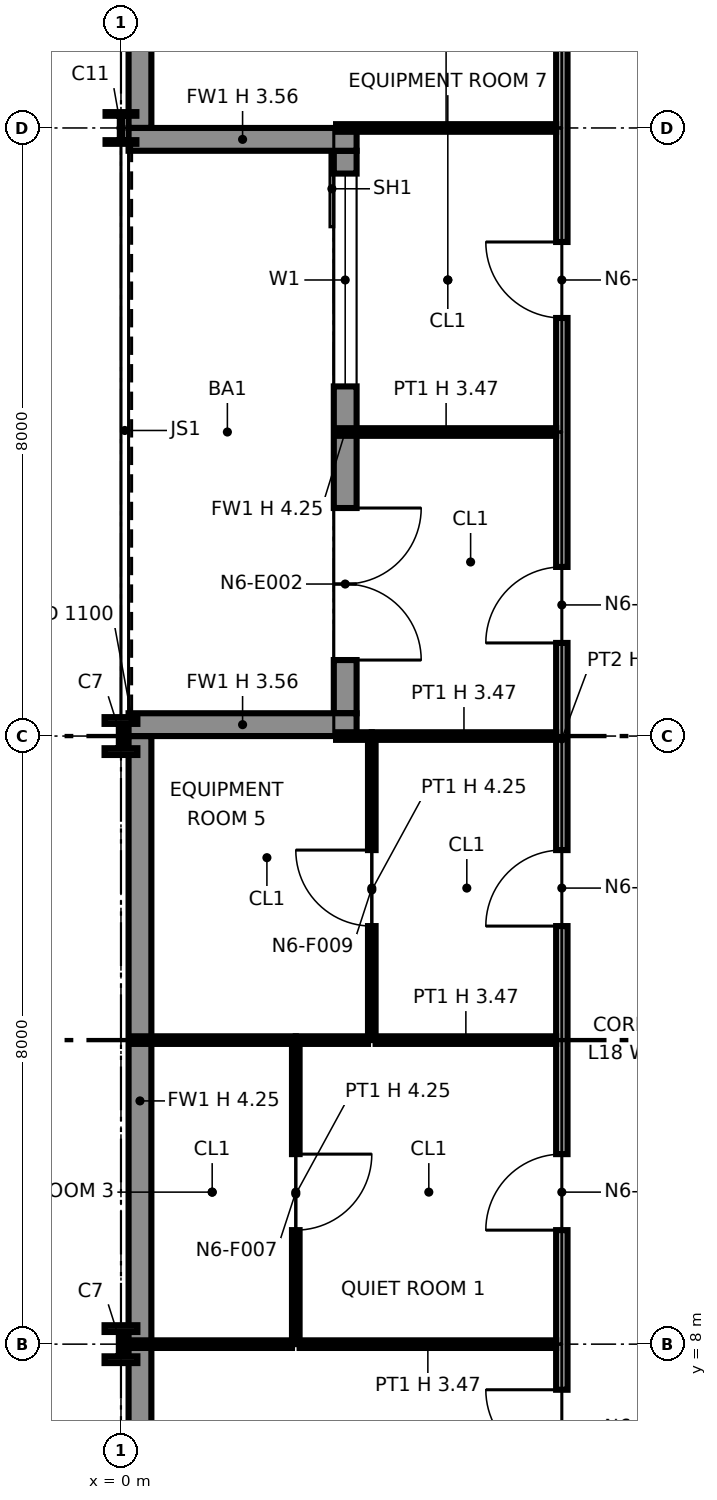
"""IFC4 building model, lengths in metres.
Left out: names, types, materials, properties, quantities, classifications, styles, units other than length and angle.
Written with IfcOpenShell. Run it as: python <this file> out.ifc"""

import sys

from ifc_helpers import new_model, si_unit, direction, frame, frame_2d, origin, origin_2d, place, context, subcontext, project, spatial, polyline, rectangle, i_section, outline, extrude, element, fill, save


model = new_model("IFC4")
c1 = context("Model", 3, precision=1e-05, world=origin(), true_north=direction((0.0, 1.0)))
c2 = subcontext(c1, "Body", "Model", "MODEL_VIEW")
j1 = project(units=[si_unit("LENGTHUNIT", "METRE"), si_unit("PLANEANGLEUNIT", "RADIAN")], contexts=[c1])
p1 = place(None, origin())
s1 = spatial("IfcSite", under=j1, at=p1, CompositionType="ELEMENT")
p2 = place(p1, origin())
s2 = spatial("IfcBuilding", under=s1, at=p2, CompositionType="ELEMENT")
p3 = place(p2, frame((0.0, 0.0, 96.4)))
s3 = spatial("IfcBuildingStorey", under=s2, at=p3, CompositionType="ELEMENT", Elevation=96.4)
for number, where, z_axis, x_axis in (
    (1, (0.0, 8.0, 0.0), (0.0, 0.0, 1.0), (1.0, 0.0, 0.0)),
    (2, (0.0, 16.0, 0.0), (0.0, 0.0, 1.0), (1.0, 0.0, 0.0)),
):
    element("IfcColumn", number, at=place(p3, frame(where, z_axis=z_axis, x_axis=x_axis)), inside=s3, PredefinedType="COLUMN", context=c2, shape_type="SweptSolid", body=[
        extrude(i_section(OverallWidth=0.432, OverallDepth=0.498, WebThickness=0.056, FlangeThickness=0.089, at=origin_2d()), origin(), (0.0, 0.0, 1.0), 4.25),
    ])
p4 = place(p3, frame((0.0, 24.0, 0.0), z_axis=(0.0, 0.0, 1.0), x_axis=(1.0, 0.0, 0.0)))
e3 = element("IfcColumn", 3, at=p4, inside=s3, PredefinedType="COLUMN", context=c2, shape_type="SweptSolid", body=[
    extrude(i_section(OverallWidth=0.406, OverallDepth=0.417, WebThickness=0.03, FlangeThickness=0.048, at=origin_2d()), origin(), (0.0, 0.0, 1.0), 4.25),
])
p5 = place(p3, frame((0.25, 32.0, 0.0), z_axis=(0.0, 0.0, 1.0), x_axis=(0.0, -1.0, 0.0)))
e4 = element("IfcWall", 4, at=p5, inside=s3, PredefinedType="SOLIDWALL", context=c2, shape_type="SweptSolid", body=[
    extrude(rectangle(XDim=8.0, YDim=0.3, at=frame_2d((4.0, 0.0))), origin(), (0.0, 0.0, 1.0), 4.25),
])
p6 = place(p3, frame((2.95, 23.7, 0.0), z_axis=(0.0, 0.0, 1.0), x_axis=(0.0, -1.0, 0.0)))
e5 = element("IfcWall", 5, at=p6, inside=s3, PredefinedType="SOLIDWALL", context=c2, shape_type="SweptSolid", body=[
    extrude(rectangle(XDim=7.4, YDim=0.3, at=frame_2d((3.7, 0.0))), origin(), (0.0, 0.0, 1.0), 4.25),
])
p7 = place(p6, frame((0.3, 0.0, 0.9)))
e6 = element("IfcOpeningElement", 6, at=p7, cuts=e5, PredefinedType="OPENING", context=c2, shape_type="SweptSolid", body=[
    extrude(rectangle(XDim=2.8, YDim=2.2, at=frame_2d((1.4, 1.1))), frame((0.0, 0.16, 0.0), z_axis=(0.0, -1.0, 0.0), x_axis=(1.0, 0.0, 0.0)), (0.0, 0.0, 1.0), 0.32),
])
p8 = place(p6, frame((4.7, 0.0, 0.0)))
e7 = element("IfcOpeningElement", 7, at=p8, cuts=e5, PredefinedType="OPENING", context=c2, shape_type="SweptSolid", body=[
    extrude(rectangle(XDim=2.0, YDim=2.4, at=frame_2d((1.0, 1.2))), frame((0.0, 0.16, 0.0), z_axis=(0.0, -1.0, 0.0), x_axis=(1.0, 0.0, 0.0)), (0.0, 0.0, 1.0), 0.32),
])
for number, where, z_axis, x_axis in (
    (8, (0.1, 23.85, 0.0), (0.0, 0.0, 1.0), (1.0, 0.0, 0.0)),
    (9, (0.1, 16.15, 0.0), (0.0, 0.0, 1.0), (1.0, 0.0, 0.0)),
):
    element("IfcWall", number, at=place(p3, frame(where, z_axis=z_axis, x_axis=x_axis)), inside=s3, PredefinedType="SOLIDWALL", context=c2, shape_type="SweptSolid", body=[
        extrude(rectangle(XDim=3.0, YDim=0.3, at=frame_2d((1.5, 0.0))), origin(), (0.0, 0.0, 1.0), 3.556),
    ])
p9 = place(p3, frame((0.25, 16.0, 0.0), z_axis=(0.0, 0.0, 1.0), x_axis=(0.0, -1.0, 0.0)))
e10 = element("IfcWall", 10, at=p9, inside=s3, PredefinedType="SOLIDWALL", context=c2, shape_type="SweptSolid", body=[
    extrude(rectangle(XDim=9.6, YDim=0.3, at=frame_2d((4.8, 0.0))), origin(), (0.0, 0.0, 1.0), 4.25),
])
p10 = place(p3, frame((5.8, 5.8, 0.0), z_axis=(0.0, 0.0, 1.0), x_axis=(0.0, 1.0, 0.0)))
e11 = element("IfcWall", 11, at=p10, inside=s3, PredefinedType="PARTITIONING", context=c2, shape_type="SweptSolid", body=[
    extrude(outline(polyline([(0.0, 0.0), (20.325, 0.0), (20.325, 4.25), (18.5, 4.25), (18.498, 3.47), (17.902, 3.47), (17.9, 4.25), (14.5, 4.25), (14.498, 3.47), (13.902, 3.47), (13.9, 4.25), (10.5, 4.25), (10.498, 3.47), (9.902, 3.47), (9.9, 4.25), (6.5, 4.25), (6.498, 3.47), (5.902, 3.47), (5.9, 4.25), (2.5, 4.25), (2.498, 3.47), (1.902, 3.47), (1.9, 4.25), (0.0, 4.25), (0.0, 0.0)])), frame((0.0, 0.075, 0.0), z_axis=(0.0, -1.0, 0.0), x_axis=(1.0, 0.0, 0.0)), (0.0, 0.0, 1.0), 0.15),
])
p11 = place(p10, frame((0.6, 0.0, 0.0)))
e12 = element("IfcOpeningElement", 12, at=p11, cuts=e11, PredefinedType="OPENING", context=c2, shape_type="SweptSolid", body=[
    extrude(rectangle(XDim=1.0, YDim=2.1, at=frame_2d((0.5, 1.05))), frame((0.0, 0.085, 0.0), z_axis=(0.0, -1.0, 0.0), x_axis=(1.0, 0.0, 0.0)), (0.0, 0.0, 1.0), 0.17),
])
p12 = place(p10, frame((3.7, 0.0, 0.0)))
e13 = element("IfcOpeningElement", 13, at=p12, cuts=e11, PredefinedType="OPENING", context=c2, shape_type="SweptSolid", body=[
    extrude(rectangle(XDim=1.0, YDim=2.1, at=frame_2d((0.5, 1.05))), frame((0.0, 0.085, 0.0), z_axis=(0.0, -1.0, 0.0), x_axis=(1.0, 0.0, 0.0)), (0.0, 0.0, 1.0), 0.17),
])
p13 = place(p10, frame((7.7, 0.0, 0.0)))
e14 = element("IfcOpeningElement", 14, at=p13, cuts=e11, PredefinedType="OPENING", context=c2, shape_type="SweptSolid", body=[
    extrude(rectangle(XDim=1.0, YDim=2.1, at=frame_2d((0.5, 1.05))), frame((0.0, 0.085, 0.0), z_axis=(0.0, -1.0, 0.0), x_axis=(1.0, 0.0, 0.0)), (0.0, 0.0, 1.0), 0.17),
])
p14 = place(p10, frame((11.425, 0.0, 0.0)))
e15 = element("IfcOpeningElement", 15, at=p14, cuts=e11, PredefinedType="OPENING", context=c2, shape_type="SweptSolid", body=[
    extrude(rectangle(XDim=1.0, YDim=2.1, at=frame_2d((0.5, 1.05))), frame((0.0, 0.085, 0.0), z_axis=(0.0, -1.0, 0.0), x_axis=(1.0, 0.0, 0.0)), (0.0, 0.0, 1.0), 0.17),
])
p15 = place(p10, frame((15.7, 0.0, 0.0)))
e16 = element("IfcOpeningElement", 16, at=p15, cuts=e11, PredefinedType="OPENING", context=c2, shape_type="SweptSolid", body=[
    extrude(rectangle(XDim=1.0, YDim=2.1, at=frame_2d((0.5, 1.05))), frame((0.0, 0.085, 0.0), z_axis=(0.0, -1.0, 0.0), x_axis=(1.0, 0.0, 0.0)), (0.0, 0.0, 1.0), 0.17),
])
p16 = place(p3, frame((0.13, 8.0, 0.0), z_axis=(0.0, 0.0, 1.0), x_axis=(1.0, 0.0, 0.0)))
e17 = element("IfcWall", 17, at=p16, inside=s3, PredefinedType="PARTITIONING", context=c2, shape_type="SweptSolid", body=[
    extrude(rectangle(XDim=2.12, YDim=0.1, at=frame_2d((1.06, 0.0))), origin(), (0.0, 0.0, 1.0), 3.47),
])
p17 = place(p3, frame((2.35, 8.0, 0.0), z_axis=(0.0, 0.0, 1.0), x_axis=(1.0, 0.0, 0.0)))
e18 = element("IfcWall", 18, at=p17, inside=s3, PredefinedType="PARTITIONING", context=c2, shape_type="SweptSolid", body=[
    extrude(rectangle(XDim=3.375, YDim=0.1, at=frame_2d((1.688, 0.0))), origin(), (0.0, 0.0, 1.0), 3.47),
])
p18 = place(p3, frame((2.3, 8.0, 0.0), z_axis=(0.0, 0.0, 1.0), x_axis=(0.0, 1.0, 0.0)))
e19 = element("IfcWall", 19, at=p18, inside=s3, PredefinedType="PARTITIONING", context=c2, shape_type="SweptSolid", body=[
    extrude(rectangle(XDim=3.95, YDim=0.1, at=frame_2d((1.975, 0.0))), origin(), (0.0, 0.0, 1.0), 4.25),
])
p19 = place(p18, frame((2.5, 0.0, 0.0), z_axis=(0.0, 0.0, 1.0), x_axis=(-1.0, 0.0, 0.0)))
e20 = element("IfcOpeningElement", 20, at=p19, cuts=e19, PredefinedType="OPENING", context=c2, shape_type="SweptSolid", body=[
    extrude(rectangle(XDim=1.0, YDim=2.1, at=frame_2d((0.5, 1.05))), frame((0.0, 0.06, 0.0), z_axis=(0.0, -1.0, 0.0), x_axis=(1.0, 0.0, 0.0)), (0.0, 0.0, 1.0), 0.12),
])
p20 = place(p3, frame((0.13, 12.0, 0.0), z_axis=(0.0, 0.0, 1.0), x_axis=(1.0, 0.0, 0.0)))
e21 = element("IfcWall", 21, at=p20, inside=s3, PredefinedType="PARTITIONING", context=c2, shape_type="SweptSolid", body=[
    extrude(rectangle(XDim=2.17, YDim=0.1, at=frame_2d((1.085, 0.0))), origin(), (0.0, 0.0, 1.0), 3.47),
])
p21 = place(p3, frame((2.3, 12.0, 0.0), z_axis=(0.0, 0.0, 1.0), x_axis=(1.0, 0.0, 0.0)))
e22 = element("IfcWall", 22, at=p21, inside=s3, PredefinedType="PARTITIONING", context=c2, shape_type="SweptSolid", body=[
    extrude(rectangle(XDim=0.95, YDim=0.1, at=frame_2d((0.475, 0.0))), origin(), (0.0, 0.0, 1.0), 3.47),
])
p22 = place(p3, frame((3.35, 12.0, 0.0), z_axis=(0.0, 0.0, 1.0), x_axis=(1.0, 0.0, 0.0)))
e23 = element("IfcWall", 23, at=p22, inside=s3, PredefinedType="PARTITIONING", context=c2, shape_type="SweptSolid", body=[
    extrude(rectangle(XDim=2.375, YDim=0.1, at=frame_2d((1.188, 0.0))), origin(), (0.0, 0.0, 1.0), 3.47),
])
p23 = place(p3, frame((3.3, 12.0, 0.0), z_axis=(0.0, 0.0, 1.0), x_axis=(0.0, 1.0, 0.0)))
e24 = element("IfcWall", 24, at=p23, inside=s3, PredefinedType="PARTITIONING", context=c2, shape_type="SweptSolid", body=[
    extrude(rectangle(XDim=3.95, YDim=0.1, at=frame_2d((1.975, 0.0))), origin(), (0.0, 0.0, 1.0), 4.25),
])
p24 = place(p23, frame((1.5, 0.0, 0.0)))
e25 = element("IfcOpeningElement", 25, at=p24, cuts=e24, PredefinedType="OPENING", context=c2, shape_type="SweptSolid", body=[
    extrude(rectangle(XDim=1.0, YDim=2.1, at=frame_2d((0.5, 1.05))), frame((0.0, 0.06, 0.0), z_axis=(0.0, -1.0, 0.0), x_axis=(1.0, 0.0, 0.0)), (0.0, 0.0, 1.0), 0.12),
])
p25 = place(p3, frame((2.83, 16.0, 0.0), z_axis=(0.0, 0.0, 1.0), x_axis=(1.0, 0.0, 0.0)))
e26 = element("IfcWall", 26, at=p25, inside=s3, PredefinedType="PARTITIONING", context=c2, shape_type="SweptSolid", body=[
    extrude(rectangle(XDim=0.47, YDim=0.1, at=frame_2d((0.235, 0.0))), origin(), (0.0, 0.0, 1.0), 3.47),
])
p26 = place(p3, frame((3.3, 16.0, 0.0), z_axis=(0.0, 0.0, 1.0), x_axis=(1.0, 0.0, 0.0)))
e27 = element("IfcWall", 27, at=p26, inside=s3, PredefinedType="PARTITIONING", context=c2, shape_type="SweptSolid", body=[
    extrude(rectangle(XDim=2.425, YDim=0.1, at=frame_2d((1.212, 0.0))), origin(), (0.0, 0.0, 1.0), 3.47),
])
for number, where, z_axis, x_axis in (
    (28, (2.83, 20.0, 0.0), (0.0, 0.0, 1.0), (1.0, 0.0, 0.0)),
    (29, (2.83, 24.0, 0.0), (0.0, 0.0, 1.0), (1.0, 0.0, 0.0)),
):
    element("IfcWall", number, at=place(p3, frame(where, z_axis=z_axis, x_axis=x_axis)), inside=s3, PredefinedType="PARTITIONING", context=c2, shape_type="SweptSolid", body=[
        extrude(rectangle(XDim=2.895, YDim=0.1, at=frame_2d((1.448, 0.0))), origin(), (0.0, 0.0, 1.0), 3.47),
    ])
p27 = place(p7, origin())
e30 = element("IfcWindow", 30, at=p27, inside=s3, PartitioningType="SINGLE_PANEL", PredefinedType="WINDOW", context=c2, shape_type="SweptSolid", body=[
    extrude(rectangle(XDim=2.8, YDim=2.2, at=frame_2d((1.4, 1.1))), frame((0.0, 0.03, 0.0), z_axis=(0.0, -1.0, 0.0), x_axis=(1.0, 0.0, 0.0)), (0.0, 0.0, 1.0), 0.06),
])
fill(e6, e30)
p28 = place(p8, origin())
e31 = element("IfcDoor", 31, at=p28, inside=s3, OperationType="DOUBLE_DOOR_SINGLE_SWING", PredefinedType="DOOR", context=c2, shape_type="SweptSolid", body=[
    extrude(rectangle(XDim=2.0, YDim=2.4, at=frame_2d((1.0, 1.2))), frame((0.0, 0.025, 0.0), z_axis=(0.0, -1.0, 0.0), x_axis=(1.0, 0.0, 0.0)), (0.0, 0.0, 1.0), 0.05),
])
fill(e7, e31)
p29 = place(p11, origin())
e32 = element("IfcDoor", 32, at=p29, inside=s3, OperationType="SINGLE_SWING_RIGHT", PredefinedType="DOOR", context=c2, shape_type="SweptSolid", body=[
    extrude(rectangle(XDim=1.0, YDim=2.1, at=frame_2d((0.5, 1.05))), frame((0.0, 0.025, 0.0), z_axis=(0.0, -1.0, 0.0), x_axis=(1.0, 0.0, 0.0)), (0.0, 0.0, 1.0), 0.05),
])
fill(e12, e32)
p30 = place(p12, origin())
e33 = element("IfcDoor", 33, at=p30, inside=s3, OperationType="SINGLE_SWING_LEFT", PredefinedType="DOOR", context=c2, shape_type="SweptSolid", body=[
    extrude(rectangle(XDim=1.0, YDim=2.1, at=frame_2d((0.5, 1.05))), frame((0.0, 0.025, 0.0), z_axis=(0.0, -1.0, 0.0), x_axis=(1.0, 0.0, 0.0)), (0.0, 0.0, 1.0), 0.05),
])
fill(e13, e33)
p31 = place(p19, origin())
e34 = element("IfcDoor", 34, at=p31, inside=s3, OperationType="SINGLE_SWING_LEFT", PredefinedType="DOOR", context=c2, shape_type="SweptSolid", body=[
    extrude(rectangle(XDim=1.0, YDim=2.1, at=frame_2d((0.5, 1.05))), frame((0.0, 0.025, 0.0), z_axis=(0.0, -1.0, 0.0), x_axis=(1.0, 0.0, 0.0)), (0.0, 0.0, 1.0), 0.05),
])
fill(e20, e34)
p32 = place(p13, origin())
e35 = element("IfcDoor", 35, at=p32, inside=s3, OperationType="SINGLE_SWING_LEFT", PredefinedType="DOOR", context=c2, shape_type="SweptSolid", body=[
    extrude(rectangle(XDim=1.0, YDim=2.1, at=frame_2d((0.5, 1.05))), frame((0.0, 0.025, 0.0), z_axis=(0.0, -1.0, 0.0), x_axis=(1.0, 0.0, 0.0)), (0.0, 0.0, 1.0), 0.05),
])
fill(e14, e35)
p33 = place(p24, origin())
e36 = element("IfcDoor", 36, at=p33, inside=s3, OperationType="SINGLE_SWING_RIGHT", PredefinedType="DOOR", context=c2, shape_type="SweptSolid", body=[
    extrude(rectangle(XDim=1.0, YDim=2.1, at=frame_2d((0.5, 1.05))), frame((0.0, 0.025, 0.0), z_axis=(0.0, -1.0, 0.0), x_axis=(1.0, 0.0, 0.0)), (0.0, 0.0, 1.0), 0.05),
])
fill(e25, e36)
p34 = place(p14, origin())
e37 = element("IfcDoor", 37, at=p34, inside=s3, OperationType="SINGLE_SWING_LEFT", PredefinedType="DOOR", context=c2, shape_type="SweptSolid", body=[
    extrude(rectangle(XDim=1.0, YDim=2.1, at=frame_2d((0.5, 1.05))), frame((0.0, 0.025, 0.0), z_axis=(0.0, -1.0, 0.0), x_axis=(1.0, 0.0, 0.0)), (0.0, 0.0, 1.0), 0.05),
])
fill(e15, e37)
p35 = place(p15, origin())
e38 = element("IfcDoor", 38, at=p35, inside=s3, OperationType="SINGLE_SWING_RIGHT", PredefinedType="DOOR", context=c2, shape_type="SweptSolid", body=[
    extrude(rectangle(XDim=1.0, YDim=2.1, at=frame_2d((0.5, 1.05))), frame((0.0, 0.025, 0.0), z_axis=(0.0, -1.0, 0.0), x_axis=(1.0, 0.0, 0.0)), (0.0, 0.0, 1.0), 0.05),
])
fill(e16, e38)
save(model, sys.argv[1])
